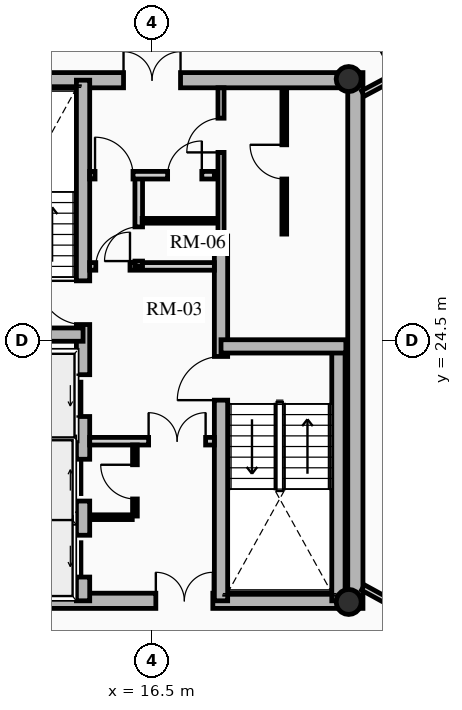
"""IFC4 building model, lengths in metres.
Left out: names, types, materials, properties, quantities, classifications, styles, units other than length and angle.
Written with IfcOpenShell. Run it as: python <this file> out.ifc"""

import sys

from ifc_helpers import new_model, si_unit, direction, frame, frame_2d, origin, origin_2d, place, context, subcontext, project, spatial, rectangle, hollow_circle, extrude, source, transform, mapped, element, fill, save


model = new_model("IFC4")
c1 = context("Model", 3, precision=1e-05, world=origin(), true_north=direction((0.0, 1.0)))
c2 = subcontext(c1, "Body", "Model", "MODEL_VIEW")
j1 = project(units=[si_unit("LENGTHUNIT", "METRE"), si_unit("PLANEANGLEUNIT", "RADIAN")], contexts=[c1])
p1 = place(None, origin())
s1 = spatial("IfcSite", under=j1, at=p1, CompositionType="ELEMENT")
p2 = place(p1, origin())
s2 = spatial("IfcBuilding", under=s1, at=p2, CompositionType="ELEMENT")
p3 = place(p2, frame((0.0, 0.0, 208.3)))
s3 = spatial("IfcBuildingStorey", under=s2, at=p3, CompositionType="ELEMENT", Elevation=208.3)
p4 = place(p3, frame((21.85, 17.45, 0.0), z_axis=(0.0, 0.0, 1.0), x_axis=(0.0, 1.0, 0.0)))
e1 = element("IfcWall", 1, at=p4, inside=s3, PredefinedType="SHEAR", context=c2, shape_type="SweptSolid", body=[
    extrude(rectangle(XDim=14.1, YDim=0.4, at=frame_2d((7.05, 0.0))), origin(), (0.0, 0.0, 1.0), 2.91),
])
p5 = place(p3, frame((11.15, 17.65, 0.0), z_axis=(0.0, 0.0, 1.0), x_axis=(1.0, 0.0, 0.0)))
e2 = element("IfcWall", 2, at=p5, inside=s3, PredefinedType="SHEAR", context=c2, shape_type="SweptSolid", body=[
    extrude(rectangle(XDim=10.7, YDim=0.4, at=frame_2d((5.35, 0.0))), origin(), (0.0, 0.0, 1.0), 2.91),
])
m1 = source(origin(), c2, "Body", "SweptSolid", [
    extrude(rectangle(XDim=1.5, YDim=2.02, at=frame_2d((0.75, 1.01))), frame((0.0, 0.21, 0.0), z_axis=(0.0, -1.0, 0.0), x_axis=(1.0, 0.0, 0.0)), (0.0, 0.0, 1.0), 0.42),
])
p6 = place(p5, frame((5.45, 0.0, 0.0)))
e3 = element("IfcOpeningElement", 3, at=p6, cuts=e2, PredefinedType="OPENING", context=c2, shape_type="MappedRepresentation", body=[
    mapped(m1, transform((0.0, 0.0, 0.0), x_axis=(1.0, 0.0, 0.0), y_axis=(0.0, 1.0, 0.0), z_axis=(0.0, 0.0, 1.0), scale=1.0)),
])
p7 = place(p3, frame((11.15, 31.35, 0.0), z_axis=(0.0, 0.0, 1.0), x_axis=(1.0, 0.0, 0.0)))
e4 = element("IfcWall", 4, at=p7, inside=s3, PredefinedType="SHEAR", context=c2, shape_type="SweptSolid", body=[
    extrude(rectangle(XDim=10.7, YDim=0.4, at=frame_2d((5.35, 0.0))), origin(), (0.0, 0.0, 1.0), 2.91),
])
p8 = place(p7, frame((4.6, 0.0, 0.0)))
e5 = element("IfcOpeningElement", 5, at=p8, cuts=e4, PredefinedType="OPENING", context=c2, shape_type="MappedRepresentation", body=[
    mapped(m1, transform((0.0, 0.0, 0.0), x_axis=(1.0, 0.0, 0.0), y_axis=(0.0, 1.0, 0.0), z_axis=(0.0, 0.0, 1.0), scale=1.0)),
])
p9 = place(p3, frame((14.685, 17.65, 0.0), z_axis=(0.0, 0.0, 1.0), x_axis=(0.0, 1.0, 0.0)))
e6 = element("IfcWall", 6, at=p9, inside=s3, PredefinedType="SHEAR", context=c2, shape_type="SweptSolid", body=[
    extrude(rectangle(XDim=13.7, YDim=0.35, at=frame_2d((6.85, 0.0))), origin(), (0.0, 0.0, 1.0), 2.91),
])
m2 = source(origin(), c2, "Body", "SweptSolid", [
    extrude(rectangle(XDim=1.1, YDim=2.015, at=frame_2d((0.55, 1.007))), frame((0.0, 0.185, 0.0), z_axis=(0.0, -1.0, 0.0), x_axis=(1.0, 0.0, 0.0)), (0.0, 0.0, 1.0), 0.37),
])
p10 = place(p9, frame((4.85, 0.0, 0.0)))
e7 = element("IfcOpeningElement", 7, at=p10, cuts=e6, PredefinedType="OPENING", context=c2, shape_type="MappedRepresentation", body=[
    mapped(m2, transform((0.0, 0.0, 0.0), x_axis=(1.0, 0.0, 0.0), y_axis=(0.0, 1.0, 0.0), z_axis=(0.0, 0.0, 1.0), scale=1.0)),
])
p11 = place(p9, frame((0.625, 0.0, 0.0)))
e8 = element("IfcOpeningElement", 8, at=p11, cuts=e6, PredefinedType="OPENING", context=c2, shape_type="MappedRepresentation", body=[
    mapped(m2, transform((0.0, 0.0, 0.0), x_axis=(1.0, 0.0, 0.0), y_axis=(0.0, 1.0, 0.0), z_axis=(0.0, 0.0, 1.0), scale=1.0)),
])
p12 = place(p9, frame((2.625, 0.0, 0.0)))
e9 = element("IfcOpeningElement", 9, at=p12, cuts=e6, PredefinedType="OPENING", context=c2, shape_type="MappedRepresentation", body=[
    mapped(m2, transform((0.0, 0.0, 0.0), x_axis=(1.0, 0.0, 0.0), y_axis=(0.0, 1.0, 0.0), z_axis=(0.0, 0.0, 1.0), scale=1.0)),
])
m3 = source(origin(), c2, "Body", "SweptSolid", [
    extrude(rectangle(XDim=1.15, YDim=2.02, at=frame_2d((0.575, 1.01))), frame((0.0, 0.185, 0.0), z_axis=(0.0, -1.0, 0.0), x_axis=(1.0, 0.0, 0.0)), (0.0, 0.0, 1.0), 0.37),
])
p13 = place(p9, frame((7.27, 0.0, 0.0)))
e10 = element("IfcOpeningElement", 10, at=p13, cuts=e6, PredefinedType="OPENING", context=c2, shape_type="MappedRepresentation", body=[
    mapped(m3, transform((0.0, 0.0, 0.0), x_axis=(1.0, 0.0, 0.0), y_axis=(0.0, 1.0, 0.0), z_axis=(0.0, 0.0, 1.0), scale=1.0)),
])
p14 = place(p3, frame((18.315, 17.65, 0.0), z_axis=(0.0, 0.0, 1.0), x_axis=(0.0, 1.0, 0.0)))
e11 = element("IfcWall", 11, at=p14, inside=s3, PredefinedType="SHEAR", context=c2, shape_type="SweptSolid", body=[
    extrude(rectangle(XDim=9.6, YDim=0.35, at=frame_2d((4.8, 0.0))), origin(), (0.0, 0.0, 1.0), 2.91),
])
p15 = place(p14, frame((5.28, 0.0, 0.0)))
e12 = element("IfcOpeningElement", 12, at=p15, cuts=e11, PredefinedType="OPENING", context=c2, shape_type="MappedRepresentation", body=[
    mapped(m3, transform((0.0, 0.0, 0.0), x_axis=(1.0, 0.0, 0.0), y_axis=(0.0, 1.0, 0.0), z_axis=(0.0, 0.0, 1.0), scale=1.0)),
])
p16 = place(p3, frame((11.4, 24.655, 0.0), z_axis=(0.0, 0.0, 1.0), x_axis=(1.0, 0.0, 0.0)))
e13 = element("IfcWall", 13, at=p16, inside=s3, PredefinedType="SHEAR", context=c2, shape_type="SweptSolid", body=[
    extrude(rectangle(XDim=3.285, YDim=0.35, at=frame_2d((1.643, 0.0))), origin(), (0.0, 0.0, 1.0), 2.91),
])
p17 = place(p3, frame((21.405, 17.65, 0.0), z_axis=(0.0, 0.0, 1.0), x_axis=(0.0, 1.0, 0.0)))
e14 = element("IfcWall", 14, at=p17, inside=s3, PredefinedType="SHEAR", context=c2, shape_type="SweptSolid", body=[
    extrude(rectangle(XDim=6.695, YDim=0.35, at=frame_2d((3.348, 0.0))), origin(), (0.0, 0.0, 1.0), 2.91),
])
p18 = place(p3, frame((18.315, 24.345, 0.0), z_axis=(0.0, 0.0, 1.0), x_axis=(1.0, 0.0, 0.0)))
e15 = element("IfcWall", 15, at=p18, inside=s3, PredefinedType="SHEAR", context=c2, shape_type="SweptSolid", body=[
    extrude(rectangle(XDim=3.285, YDim=0.35, at=frame_2d((1.643, 0.0))), origin(), (0.0, 0.0, 1.0), 2.91),
])
for number, where, z_axis, x_axis in (
    (16, (21.675, 17.62, 0.0), (0.0, 0.0, 1.0), (1.0, 0.0, 0.0)),
    (17, (21.675, 31.38, 0.0), (0.0, 0.0, 1.0), (1.0, 0.0, 0.0)),
):
    element("IfcColumn", number, at=place(p3, frame(where, z_axis=z_axis, x_axis=x_axis)), inside=s3, PredefinedType="COLUMN", context=c2, shape_type="SweptSolid", body=[
        extrude(hollow_circle(Radius=0.33, WallThickness=0.025, at=origin_2d()), origin(), (0.0, 0.0, 1.0), 2.91),
    ])
for number, where, z_axis, x_axis in (
    (18, (11.52, 21.8, 0.0), (0.0, 0.0, 1.0), (1.0, 0.0, 0.0)),
    (19, (11.52, 19.825, 0.0), (0.0, 0.0, 1.0), (1.0, 0.0, 0.0)),
):
    element("IfcWall", number, at=place(p3, frame(where, z_axis=z_axis, x_axis=x_axis)), inside=s3, PredefinedType="SHEAR", context=c2, shape_type="SweptSolid", body=[
        extrude(rectangle(XDim=2.97, YDim=0.2, at=frame_2d((1.485, 0.0))), origin(), (0.0, 0.0, 1.0), 2.91),
    ])
p19 = place(p3, frame((14.86, 21.85, 0.0), z_axis=(0.0, 0.0, 1.0), x_axis=(1.0, 0.0, 0.0)))
e20 = element("IfcWall", 20, at=p19, inside=s3, PredefinedType="PARTITIONING", context=c2, shape_type="SweptSolid", body=[
    extrude(rectangle(XDim=3.28, YDim=0.2, at=frame_2d((1.64, 0.0))), origin(), (0.0, 0.0, 1.0), 2.685),
])
m4 = source(origin(), c2, "Body", "SweptSolid", [
    extrude(rectangle(XDim=1.5, YDim=2.02, at=frame_2d((0.75, 1.01))), frame((0.0, 0.11, 0.0), z_axis=(0.0, -1.0, 0.0), x_axis=(1.0, 0.0, 0.0)), (0.0, 0.0, 1.0), 0.22),
])
p20 = place(p19, frame((1.55, 0.0, 0.0)))
e21 = element("IfcOpeningElement", 21, at=p20, cuts=e20, PredefinedType="OPENING", context=c2, shape_type="MappedRepresentation", body=[
    mapped(m4, transform((0.0, 0.0, 0.0), x_axis=(1.0, 0.0, 0.0), y_axis=(0.0, 1.0, 0.0), z_axis=(0.0, 0.0, 1.0), scale=1.0)),
])
p21 = place(p3, frame((14.86, 26.45, 0.0), z_axis=(0.0, 0.0, 1.0), x_axis=(1.0, 0.0, 0.0)))
e22 = element("IfcWall", 22, at=p21, inside=s3, PredefinedType="PARTITIONING", context=c2, shape_type="SweptSolid", body=[
    extrude(rectangle(XDim=3.28, YDim=0.2, at=frame_2d((1.64, 0.0))), origin(), (0.0, 0.0, 1.0), 2.685),
])
m5 = source(origin(), c2, "Body", "SweptSolid", [
    extrude(rectangle(XDim=0.9, YDim=2.005, at=frame_2d((0.45, 1.002))), frame((0.0, 0.11, 0.0), z_axis=(0.0, -1.0, 0.0), x_axis=(1.0, 0.0, 0.0)), (0.0, 0.0, 1.0), 0.22),
])
p22 = place(p21, frame((0.16, 0.0, 0.0)))
e23 = element("IfcOpeningElement", 23, at=p22, cuts=e22, PredefinedType="OPENING", context=c2, shape_type="MappedRepresentation", body=[
    mapped(m5, transform((0.0, 0.0, 0.0), x_axis=(1.0, 0.0, 0.0), y_axis=(0.0, 1.0, 0.0), z_axis=(0.0, 0.0, 1.0), scale=1.0)),
])
p23 = place(p3, frame((16.15, 26.45, 0.0), z_axis=(0.0, 0.0, 1.0), x_axis=(0.0, 1.0, 0.0)))
e24 = element("IfcWall", 24, at=p23, inside=s3, PredefinedType="PARTITIONING", context=c2, shape_type="SweptSolid", body=[
    extrude(rectangle(XDim=2.4, YDim=0.2, at=frame_2d((1.2, 0.0))), origin(), (0.0, 0.0, 1.0), 2.685),
])
p24 = place(p23, frame((0.14, 0.0, 0.0)))
e25 = element("IfcOpeningElement", 25, at=p24, cuts=e24, PredefinedType="OPENING", context=c2, shape_type="MappedRepresentation", body=[
    mapped(m5, transform((0.0, 0.0, 0.0), x_axis=(1.0, 0.0, 0.0), y_axis=(0.0, 1.0, 0.0), z_axis=(0.0, 0.0, 1.0), scale=1.0)),
])
p25 = place(p3, frame((14.86, 28.85, 0.0), z_axis=(0.0, 0.0, 1.0), x_axis=(1.0, 0.0, 0.0)))
e26 = element("IfcWall", 26, at=p25, inside=s3, PredefinedType="PARTITIONING", context=c2, shape_type="SweptSolid", body=[
    extrude(rectangle(XDim=3.28, YDim=0.2, at=frame_2d((1.64, 0.0))), origin(), (0.0, 0.0, 1.0), 2.685),
])
m6 = source(origin(), c2, "Body", "SweptSolid", [
    extrude(rectangle(XDim=1.0, YDim=2.015, at=frame_2d((0.5, 1.007))), frame((0.0, 0.11, 0.0), z_axis=(0.0, -1.0, 0.0), x_axis=(1.0, 0.0, 0.0)), (0.0, 0.0, 1.0), 0.22),
])
p26 = place(p25, frame((0.14, 0.0, 0.0)))
e27 = element("IfcOpeningElement", 27, at=p26, cuts=e26, PredefinedType="OPENING", context=c2, shape_type="MappedRepresentation", body=[
    mapped(m6, transform((0.0, 0.0, 0.0), x_axis=(1.0, 0.0, 0.0), y_axis=(0.0, 1.0, 0.0), z_axis=(0.0, 0.0, 1.0), scale=1.0)),
])
p27 = place(p25, frame((2.05, 0.0, 0.0)))
e28 = element("IfcOpeningElement", 28, at=p27, cuts=e26, PredefinedType="OPENING", context=c2, shape_type="MappedRepresentation", body=[
    mapped(m5, transform((0.0, 0.0, 0.0), x_axis=(1.0, 0.0, 0.0), y_axis=(0.0, 1.0, 0.0), z_axis=(0.0, 0.0, 1.0), scale=1.0)),
])
p28 = place(p3, frame((16.05, 19.88, 0.0), z_axis=(0.0, 0.0, 1.0), x_axis=(0.0, 1.0, 0.0)))
e29 = element("IfcWall", 29, at=p28, inside=s3, PredefinedType="PARTITIONING", context=c2, shape_type="SweptSolid", body=[
    extrude(rectangle(XDim=1.87, YDim=0.125, at=frame_2d((0.935, 0.0))), origin(), (0.0, 0.0, 1.0), 2.685),
])
m7 = source(origin(), c2, "Body", "SweptSolid", [
    extrude(rectangle(XDim=0.9, YDim=2.005, at=frame_2d((0.45, 1.002))), frame((0.0, 0.073, 0.0), z_axis=(0.0, -1.0, 0.0), x_axis=(1.0, 0.0, 0.0)), (0.0, 0.0, 1.0), 0.145),
])
p29 = place(p28, frame((0.45, 0.0, 0.0)))
e30 = element("IfcOpeningElement", 30, at=p29, cuts=e29, PredefinedType="OPENING", context=c2, shape_type="MappedRepresentation", body=[
    mapped(m7, transform((0.0, 0.0, 0.0), x_axis=(1.0, 0.0, 0.0), y_axis=(0.0, 1.0, 0.0), z_axis=(0.0, 0.0, 1.0), scale=1.0)),
])
p30 = place(p3, frame((14.88, 19.85, 0.0), z_axis=(0.0, 0.0, 1.0), x_axis=(1.0, 0.0, 0.0)))
e31 = element("IfcWall", 31, at=p30, inside=s3, PredefinedType="PARTITIONING", context=c2, shape_type="SweptSolid", body=[
    extrude(rectangle(XDim=1.1, YDim=0.125, at=frame_2d((0.55, 0.0))), origin(), (0.0, 0.0, 1.0), 2.685),
])
p31 = place(p3, frame((16.24, 27.65, 0.0), z_axis=(0.0, 0.0, 1.0), x_axis=(1.0, 0.0, 0.0)))
e32 = element("IfcWall", 32, at=p31, inside=s3, PredefinedType="PARTITIONING", context=c2, shape_type="SweptSolid", body=[
    extrude(rectangle(XDim=1.88, YDim=0.125, at=frame_2d((0.94, 0.0))), origin(), (0.0, 0.0, 1.0), 2.685),
])
p32 = place(p3, frame((18.315, 27.25, 0.0), z_axis=(0.0, 0.0, 1.0), x_axis=(0.0, 1.0, 0.0)))
e33 = element("IfcWall", 33, at=p32, inside=s3, PredefinedType="PARTITIONING", context=c2, shape_type="SweptSolid", body=[
    extrude(rectangle(XDim=3.9, YDim=0.16, at=frame_2d((1.95, 0.0))), origin(), (0.0, 0.0, 1.0), 2.685),
])
m8 = source(origin(), c2, "Body", "SweptSolid", [
    extrude(rectangle(XDim=0.9, YDim=2.005, at=frame_2d((0.45, 1.002))), frame((0.0, 0.09, 0.0), z_axis=(0.0, -1.0, 0.0), x_axis=(1.0, 0.0, 0.0)), (0.0, 0.0, 1.0), 0.18),
])
p33 = place(p32, frame((2.2, 0.0, 0.0)))
e34 = element("IfcOpeningElement", 34, at=p33, cuts=e33, PredefinedType="OPENING", context=c2, shape_type="MappedRepresentation", body=[
    mapped(m8, transform((0.0, 0.0, 0.0), x_axis=(1.0, 0.0, 0.0), y_axis=(0.0, 1.0, 0.0), z_axis=(0.0, 0.0, 1.0), scale=1.0)),
])
p34 = place(p3, frame((19.98, 27.3, 0.0), z_axis=(0.0, 0.0, 1.0), x_axis=(0.0, 1.0, 0.0)))
e35 = element("IfcWall", 35, at=p34, inside=s3, PredefinedType="PARTITIONING", context=c2, shape_type="SweptSolid", body=[
    extrude(rectangle(XDim=3.82, YDim=0.125, at=frame_2d((1.91, 0.0))), origin(), (0.0, 0.0, 1.0), 2.685),
])
p35 = place(p34, frame((1.45, 0.0, 0.0)))
e36 = element("IfcOpeningElement", 36, at=p35, cuts=e35, PredefinedType="OPENING", context=c2, shape_type="MappedRepresentation", body=[
    mapped(m7, transform((0.0, 0.0, 0.0), x_axis=(1.0, 0.0, 0.0), y_axis=(0.0, 1.0, 0.0), z_axis=(0.0, 0.0, 1.0), scale=1.0)),
])
p36 = place(p3, frame((22.05, 31.0, 0.0), z_axis=(0.0, 0.0, 1.0), x_axis=(0.882791584709, 0.469764853908, 0.0)))
e37 = element("IfcWall", 37, at=p36, inside=s3, PredefinedType="PARTITIONING", context=c2, shape_type="SweptSolid", body=[
    extrude(rectangle(XDim=2.186, YDim=0.16, at=frame_2d((1.093, 0.0))), origin(), (0.0, 0.0, 1.0), 2.255),
])
m9 = source(origin(), c2, "Body", "SweptSolid", [
    extrude(rectangle(XDim=1.05, YDim=2.015, at=frame_2d((0.525, 1.007))), frame((0.0, 0.09, 0.0), z_axis=(0.0, -1.0, 0.0), x_axis=(1.0, 0.0, 0.0)), (0.0, 0.0, 1.0), 0.18),
])
p37 = place(p36, frame((0.936, 0.0, 0.0)))
e38 = element("IfcOpeningElement", 38, at=p37, cuts=e37, PredefinedType="OPENING", context=c2, shape_type="MappedRepresentation", body=[
    mapped(m9, transform((0.0, 0.0, 0.0), x_axis=(1.0, 0.0, 0.0), y_axis=(0.0, 1.0, 0.0), z_axis=(0.0, 0.0, 1.0), scale=1.0)),
])
p38 = place(p3, frame((22.05, 18.0, 0.0), z_axis=(0.0, 0.0, 1.0), x_axis=(0.877252891813, -0.480028503118, 0.0)))
e39 = element("IfcWall", 39, at=p38, inside=s3, PredefinedType="PARTITIONING", context=c2, shape_type="SweptSolid", body=[
    extrude(rectangle(XDim=2.282, YDim=0.16, at=frame_2d((1.141, 0.0))), origin(), (0.0, 0.0, 1.0), 2.255),
])
p39 = place(p38, frame((1.032, 0.0, 0.0)))
e40 = element("IfcOpeningElement", 40, at=p39, cuts=e39, PredefinedType="OPENING", context=c2, shape_type="MappedRepresentation", body=[
    mapped(m9, transform((0.0, 0.0, 0.0), x_axis=(1.0, 0.0, 0.0), y_axis=(0.0, 1.0, 0.0), z_axis=(0.0, 0.0, 1.0), scale=1.0)),
])
m10 = source(origin(), c2, "Body", "SweptSolid", [
    extrude(rectangle(XDim=1.1, YDim=2.015, at=frame_2d((0.55, 1.007))), frame((0.0, 0.025, 0.0), z_axis=(0.0, -1.0, 0.0), x_axis=(1.0, 0.0, 0.0)), (0.0, 0.0, 1.0), 0.05),
])
p40 = place(p10, origin())
e41 = element("IfcDoor", 41, at=p40, inside=s3, OperationType="SLIDING_TO_LEFT", PredefinedType="DOOR", context=c2, shape_type="MappedRepresentation", body=[
    mapped(m10, transform((0.0, 0.0, 0.0), x_axis=(1.0, 0.0, 0.0), y_axis=(0.0, 1.0, 0.0), z_axis=(0.0, 0.0, 1.0), scale=1.0)),
])
fill(e7, e41)
p41 = place(p11, origin())
e42 = element("IfcDoor", 42, at=p41, inside=s3, OperationType="SLIDING_TO_LEFT", PredefinedType="DOOR", context=c2, shape_type="MappedRepresentation", body=[
    mapped(m10, transform((0.0, 0.0, 0.0), x_axis=(1.0, 0.0, 0.0), y_axis=(0.0, 1.0, 0.0), z_axis=(0.0, 0.0, 1.0), scale=1.0)),
])
fill(e8, e42)
p42 = place(p12, origin())
e43 = element("IfcDoor", 43, at=p42, inside=s3, OperationType="SLIDING_TO_RIGHT", PredefinedType="DOOR", context=c2, shape_type="MappedRepresentation", body=[
    mapped(m10, transform((0.0, 0.0, 0.0), x_axis=(1.0, 0.0, 0.0), y_axis=(0.0, 1.0, 0.0), z_axis=(0.0, 0.0, 1.0), scale=1.0)),
])
fill(e9, e43)
m11 = source(origin(), c2, "Body", "SweptSolid", [
    extrude(rectangle(XDim=1.15, YDim=2.02, at=frame_2d((0.575, 1.01))), frame((0.0, 0.025, 0.0), z_axis=(0.0, -1.0, 0.0), x_axis=(1.0, 0.0, 0.0)), (0.0, 0.0, 1.0), 0.05),
])
p43 = place(p13, origin())
e44 = element("IfcDoor", 44, at=p43, inside=s3, OperationType="SINGLE_SWING_RIGHT", PredefinedType="DOOR", context=c2, shape_type="MappedRepresentation", body=[
    mapped(m11, transform((0.0, 0.0, 0.0), x_axis=(1.0, 0.0, 0.0), y_axis=(0.0, 1.0, 0.0), z_axis=(0.0, 0.0, 1.0), scale=1.0)),
])
fill(e10, e44)
p44 = place(p15, origin())
e45 = element("IfcDoor", 45, at=p44, inside=s3, OperationType="SINGLE_SWING_LEFT", PredefinedType="DOOR", context=c2, shape_type="MappedRepresentation", body=[
    mapped(m11, transform((0.0, 0.0, 0.0), x_axis=(1.0, 0.0, 0.0), y_axis=(0.0, 1.0, 0.0), z_axis=(0.0, 0.0, 1.0), scale=1.0)),
])
fill(e12, e45)
m12 = source(origin(), c2, "Body", "SweptSolid", [
    extrude(rectangle(XDim=1.5, YDim=2.02, at=frame_2d((0.75, 1.01))), frame((0.0, 0.025, 0.0), z_axis=(0.0, -1.0, 0.0), x_axis=(1.0, 0.0, 0.0)), (0.0, 0.0, 1.0), 0.05),
])
p45 = place(p8, origin())
e46 = element("IfcDoor", 46, at=p45, inside=s3, OperationType="DOUBLE_DOOR_SINGLE_SWING", PredefinedType="DOOR", context=c2, shape_type="MappedRepresentation", body=[
    mapped(m12, transform((0.0, 0.0, 0.0), x_axis=(1.0, 0.0, 0.0), y_axis=(0.0, 1.0, 0.0), z_axis=(0.0, 0.0, 1.0), scale=1.0)),
])
fill(e5, e46)
p46 = place(p6, origin())
e47 = element("IfcDoor", 47, at=p46, inside=s3, OperationType="DOUBLE_DOOR_SINGLE_SWING", PredefinedType="DOOR", context=c2, shape_type="MappedRepresentation", body=[
    mapped(m12, transform((0.0, 0.0, 0.0), x_axis=(1.0, 0.0, 0.0), y_axis=(0.0, 1.0, 0.0), z_axis=(0.0, 0.0, 1.0), scale=1.0)),
])
fill(e3, e47)
p47 = place(p20, origin())
e48 = element("IfcDoor", 48, at=p47, inside=s3, OperationType="DOUBLE_DOOR_SINGLE_SWING", PredefinedType="DOOR", context=c2, shape_type="MappedRepresentation", body=[
    mapped(m12, transform((0.0, 0.0, 0.0), x_axis=(1.0, 0.0, 0.0), y_axis=(0.0, 1.0, 0.0), z_axis=(0.0, 0.0, 1.0), scale=1.0)),
])
fill(e21, e48)
m13 = source(origin(), c2, "Body", "SweptSolid", [
    extrude(rectangle(XDim=0.9, YDim=2.005, at=frame_2d((0.45, 1.002))), frame((0.0, 0.025, 0.0), z_axis=(0.0, -1.0, 0.0), x_axis=(1.0, 0.0, 0.0)), (0.0, 0.0, 1.0), 0.05),
])
p48 = place(p22, origin())
e49 = element("IfcDoor", 49, at=p48, inside=s3, OperationType="SINGLE_SWING_RIGHT", PredefinedType="DOOR", context=c2, shape_type="MappedRepresentation", body=[
    mapped(m13, transform((0.0, 0.0, 0.0), x_axis=(1.0, 0.0, 0.0), y_axis=(0.0, 1.0, 0.0), z_axis=(0.0, 0.0, 1.0), scale=1.0)),
])
fill(e23, e49)
m14 = source(origin(), c2, "Body", "SweptSolid", [
    extrude(rectangle(XDim=1.0, YDim=2.015, at=frame_2d((0.5, 1.007))), frame((0.0, 0.025, 0.0), z_axis=(0.0, -1.0, 0.0), x_axis=(1.0, 0.0, 0.0)), (0.0, 0.0, 1.0), 0.05),
])
p49 = place(p26, origin())
e50 = element("IfcDoor", 50, at=p49, inside=s3, OperationType="SINGLE_SWING_LEFT", PredefinedType="DOOR", context=c2, shape_type="MappedRepresentation", body=[
    mapped(m14, transform((0.0, 0.0, 0.0), x_axis=(1.0, 0.0, 0.0), y_axis=(0.0, 1.0, 0.0), z_axis=(0.0, 0.0, 1.0), scale=1.0)),
])
fill(e27, e50)
p50 = place(p29, origin())
e51 = element("IfcDoor", 51, at=p50, inside=s3, OperationType="SINGLE_SWING_RIGHT", PredefinedType="DOOR", context=c2, shape_type="MappedRepresentation", body=[
    mapped(m13, transform((0.0, 0.0, 0.0), x_axis=(1.0, 0.0, 0.0), y_axis=(0.0, 1.0, 0.0), z_axis=(0.0, 0.0, 1.0), scale=1.0)),
])
fill(e30, e51)
p51 = place(p24, origin())
e52 = element("IfcDoor", 52, at=p51, inside=s3, OperationType="SINGLE_SWING_LEFT", PredefinedType="DOOR", context=c2, shape_type="MappedRepresentation", body=[
    mapped(m13, transform((0.0, 0.0, 0.0), x_axis=(1.0, 0.0, 0.0), y_axis=(0.0, 1.0, 0.0), z_axis=(0.0, 0.0, 1.0), scale=1.0)),
])
fill(e25, e52)
p52 = place(p27, origin())
e53 = element("IfcDoor", 53, at=p52, inside=s3, OperationType="SINGLE_SWING_RIGHT", PredefinedType="DOOR", context=c2, shape_type="MappedRepresentation", body=[
    mapped(m13, transform((0.0, 0.0, 0.0), x_axis=(1.0, 0.0, 0.0), y_axis=(0.0, 1.0, 0.0), z_axis=(0.0, 0.0, 1.0), scale=1.0)),
])
fill(e28, e53)
p53 = place(p33, origin())
e54 = element("IfcDoor", 54, at=p53, inside=s3, OperationType="SINGLE_SWING_LEFT", PredefinedType="DOOR", context=c2, shape_type="MappedRepresentation", body=[
    mapped(m13, transform((0.0, 0.0, 0.0), x_axis=(1.0, 0.0, 0.0), y_axis=(0.0, 1.0, 0.0), z_axis=(0.0, 0.0, 1.0), scale=1.0)),
])
fill(e34, e54)
p54 = place(p35, origin())
e55 = element("IfcDoor", 55, at=p54, inside=s3, OperationType="SINGLE_SWING_RIGHT", PredefinedType="DOOR", context=c2, shape_type="MappedRepresentation", body=[
    mapped(m13, transform((0.0, 0.0, 0.0), x_axis=(1.0, 0.0, 0.0), y_axis=(0.0, 1.0, 0.0), z_axis=(0.0, 0.0, 1.0), scale=1.0)),
])
fill(e36, e55)
save(model, sys.argv[1])
